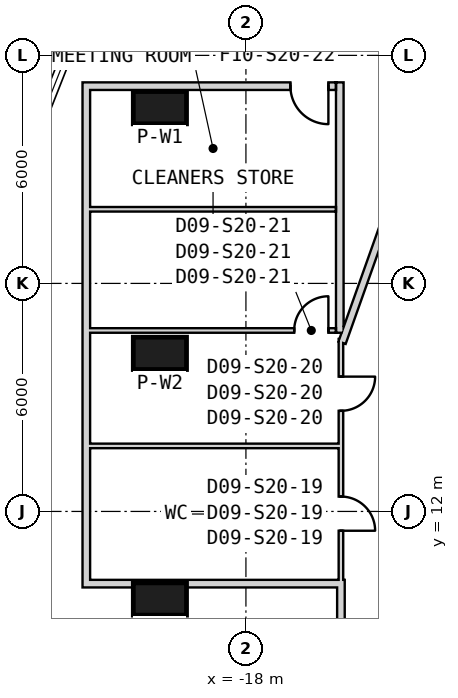
"""IFC4 building model, lengths in metres.
Left out: names, types, materials, properties, quantities, classifications, styles, units other than length and angle.
Written with IfcOpenShell. Run it as: python <this file> out.ifc"""

import sys

from ifc_helpers import new_model, si_unit, direction, frame, frame_2d, origin, origin_2d, place, context, subcontext, project, spatial, rectangle, extrude, element, fill, save


model = new_model("IFC4")
c1 = context("Model", 3, precision=1e-05, world=origin(), true_north=direction((0.0, 1.0)))
c2 = subcontext(c1, "Body", "Model", "MODEL_VIEW")
j1 = project(units=[si_unit("LENGTHUNIT", "METRE"), si_unit("PLANEANGLEUNIT", "RADIAN")], contexts=[c1])
p1 = place(None, origin())
s1 = spatial("IfcSite", under=j1, at=p1, CompositionType="ELEMENT")
p2 = place(p1, origin())
s2 = spatial("IfcBuilding", under=s1, at=p2, CompositionType="ELEMENT")
p3 = place(p2, frame((0.0, 0.0, 322.1)))
s3 = spatial("IfcBuildingStorey", under=s2, at=p3, CompositionType="ELEMENT", Elevation=322.1)
for number, where, z_axis, x_axis in (
    (1, (-20.264, 22.624, 0.0), (0.0, 0.0, 1.0), (-1.0, 0.0, 0.0)),
    (2, (-20.264, 16.16, 0.0), (0.0, 0.0, 1.0), (-1.0, 0.0, 0.0)),
    (3, (-20.264, 9.696, 0.0), (0.0, 0.0, 1.0), (-1.0, 0.0, 0.0)),
):
    element("IfcColumn", number, at=place(p3, frame(where, z_axis=z_axis, x_axis=x_axis)), inside=s3, PredefinedType="COLUMN", context=c2, shape_type="SweptSolid", body=[
        extrude(rectangle(XDim=1.4, YDim=0.85, at=origin_2d()), origin(), (0.0, 0.0, 1.0), 3.9),
    ])
p4 = place(p3, frame((-10.575, 18.316, 0.0), z_axis=(0.0, 0.0, 1.0), x_axis=(-0.499987805019, 0.866032444446, 0.0)))
e4 = element("IfcWall", 4, at=p4, inside=s3, PredefinedType="SHEAR", context=c2, shape_type="SweptSolid", body=[
    extrude(rectangle(XDim=8.787, YDim=0.6, at=frame_2d((4.394, 0.0))), origin(), (0.0, 0.0, 1.0), 3.9),
])
p5 = place(p4, frame((1.4, 0.0, 0.0)))
e5 = element("IfcOpeningElement", 5, at=p5, cuts=e4, PredefinedType="OPENING", context=c2, shape_type="SweptSolid", body=[
    extrude(rectangle(XDim=1.4, YDim=2.4, at=frame_2d((0.7, 1.2))), frame((0.0, 0.31, 0.0), z_axis=(0.0, -1.0, 0.0), x_axis=(1.0, 0.0, 0.0)), (0.0, 0.0, 1.0), 0.62),
])
p6 = place(p3, frame((-15.5, 16.538, 0.0), z_axis=(0.0, 0.0, 1.0), x_axis=(0.0, -1.0, 0.0)))
e6 = element("IfcWall", 6, at=p6, inside=s3, PredefinedType="PARTITIONING", context=c2, shape_type="SweptSolid", body=[
    extrude(rectangle(XDim=6.408, YDim=0.12, at=frame_2d((3.204, 0.0))), origin(), (0.0, 0.0, 1.0), 2.97),
])
p7 = place(p6, frame((4.146, 0.0, 0.0)))
e7 = element("IfcOpeningElement", 7, at=p7, cuts=e6, PredefinedType="OPENING", context=c2, shape_type="SweptSolid", body=[
    extrude(rectangle(XDim=0.9, YDim=2.1, at=frame_2d((0.45, 1.05))), frame((0.0, 0.07, 0.0), z_axis=(0.0, -1.0, 0.0), x_axis=(1.0, 0.0, 0.0)), (0.0, 0.0, 1.0), 0.14),
])
p8 = place(p6, frame((0.99, 0.0, 0.0)))
e8 = element("IfcOpeningElement", 8, at=p8, cuts=e6, PredefinedType="OPENING", context=c2, shape_type="SweptSolid", body=[
    extrude(rectangle(XDim=0.9, YDim=2.1, at=frame_2d((0.45, 1.05))), frame((0.0, 0.07, 0.0), z_axis=(0.0, -1.0, 0.0), x_axis=(1.0, 0.0, 0.0)), (0.0, 0.0, 1.0), 0.14),
])
p9 = place(p3, frame((-15.5, 10.2, 0.0), z_axis=(0.0, 0.0, 1.0), x_axis=(0.0, -1.0, 0.0)))
e9 = element("IfcWall", 9, at=p9, inside=s3, PredefinedType="PARTITIONING", context=c2, shape_type="SweptSolid", body=[
    extrude(rectangle(XDim=10.13, YDim=0.2, at=frame_2d((5.065, 0.0))), origin(), (0.0, 0.0, 1.0), 2.97),
])
p10 = place(p3, frame((-14.154, 20.142, 0.0), z_axis=(0.0, 0.0, 1.0), x_axis=(-0.335013345564, -0.94221338257, 0.0)))
e10 = element("IfcWall", 10, at=p10, inside=s3, PredefinedType="PARTITIONING", context=c2, shape_type="SweptSolid", body=[
    extrude(rectangle(XDim=3.929, YDim=0.2, at=frame_2d((1.964, 0.0))), origin(), (0.0, 0.0, 1.0), 2.88),
])
p11 = place(p3, frame((-22.2, 23.09, 0.0), z_axis=(0.0, 0.0, 1.0), x_axis=(0.0, -1.0, 0.0)))
e11 = element("IfcWall", 11, at=p11, inside=s3, PredefinedType="PARTITIONING", context=c2, shape_type="SweptSolid", body=[
    extrude(rectangle(XDim=3.14, YDim=0.2, at=frame_2d((1.57, 0.0))), origin(), (0.0, 0.0, 1.0), 3.6),
])
p12 = place(p3, frame((-22.2, 19.95, 0.0), z_axis=(0.0, 0.0, 1.0), x_axis=(0.0, -1.0, 0.0)))
e12 = element("IfcWall", 12, at=p12, inside=s3, PredefinedType="PARTITIONING", context=c2, shape_type="SweptSolid", body=[
    extrude(rectangle(XDim=3.188, YDim=0.2, at=frame_2d((1.594, 0.0))), origin(), (0.0, 0.0, 1.0), 3.6),
])
p13 = place(p3, frame((-22.2, 16.762, 0.0), z_axis=(0.0, 0.0, 1.0), x_axis=(0.0, -1.0, 0.0)))
e13 = element("IfcWall", 13, at=p13, inside=s3, PredefinedType="PARTITIONING", context=c2, shape_type="SweptSolid", body=[
    extrude(rectangle(XDim=6.562, YDim=0.2, at=frame_2d((3.281, 0.0))), origin(), (0.0, 0.0, 1.0), 3.6),
])
p14 = place(p3, frame((-15.6, 10.1, 0.0), z_axis=(0.0, 0.0, 1.0), x_axis=(-1.0, 0.0, 0.0)))
e14 = element("IfcWall", 14, at=p14, inside=s3, PredefinedType="PARTITIONING", context=c2, shape_type="SweptSolid", body=[
    extrude(rectangle(XDim=6.7, YDim=0.2, at=frame_2d((3.35, 0.0))), origin(), (0.0, 0.0, 1.0), 3.6),
])
p15 = place(p3, frame((-15.53, 16.702, 0.0), z_axis=(0.0, 0.0, 1.0), x_axis=(0.0, 1.0, 0.0)))
e15 = element("IfcWall", 15, at=p15, inside=s3, PredefinedType="PARTITIONING", context=c2, shape_type="SweptSolid", body=[
    extrude(rectangle(XDim=3.249, YDim=0.2, at=frame_2d((1.624, 0.0))), origin(), (0.0, 0.0, 1.0), 2.88),
])
p16 = place(p3, frame((-15.53, 19.95, 0.0), z_axis=(0.0, 0.0, 1.0), x_axis=(0.0, 1.0, 0.0)))
e16 = element("IfcWall", 16, at=p16, inside=s3, PredefinedType="PARTITIONING", context=c2, shape_type="SweptSolid", body=[
    extrude(rectangle(XDim=3.34, YDim=0.2, at=frame_2d((1.67, 0.0))), origin(), (0.0, 0.0, 1.0), 3.6),
])
p17 = place(p3, frame((-15.63, 23.19, 0.0), z_axis=(0.0, 0.0, 1.0), x_axis=(-1.0, 0.0, 0.0)))
e17 = element("IfcWall", 17, at=p17, inside=s3, PredefinedType="PARTITIONING", context=c2, shape_type="SweptSolid", body=[
    extrude(rectangle(XDim=6.67, YDim=0.2, at=frame_2d((3.335, 0.0))), origin(), (0.0, 0.0, 1.0), 3.6),
])
p18 = place(p17, frame((0.2, 0.0, 0.0)))
e18 = element("IfcOpeningElement", 18, at=p18, cuts=e17, PredefinedType="OPENING", context=c2, shape_type="SweptSolid", body=[
    extrude(rectangle(XDim=1.0, YDim=2.1, at=frame_2d((0.5, 1.05))), frame((0.0, 0.11, 0.0), z_axis=(0.0, -1.0, 0.0), x_axis=(1.0, 0.0, 0.0)), (0.0, 0.0, 1.0), 0.22),
])
p19 = place(p3, frame((-15.53, 13.724, 0.0), z_axis=(0.0, 0.0, 1.0), x_axis=(-1.0, 0.0, 0.0)))
e19 = element("IfcWall", 19, at=p19, inside=s3, PredefinedType="PARTITIONING", context=c2, shape_type="SweptSolid", body=[
    extrude(rectangle(XDim=6.57, YDim=0.12, at=frame_2d((3.285, 0.0))), origin(), (0.0, 0.0, 1.0), 2.97),
])
p20 = place(p3, frame((-22.1, 16.762, 0.0), z_axis=(0.0, 0.0, 1.0), x_axis=(1.0, 0.0, 0.0)))
e20 = element("IfcWall", 20, at=p20, inside=s3, PredefinedType="PARTITIONING", context=c2, shape_type="SweptSolid", body=[
    extrude(rectangle(XDim=6.47, YDim=0.12, at=frame_2d((3.235, 0.0))), origin(), (0.0, 0.0, 1.0), 3.6),
])
p21 = place(p20, frame((5.37, 0.0, 0.0)))
e21 = element("IfcOpeningElement", 21, at=p21, cuts=e20, PredefinedType="OPENING", context=c2, shape_type="SweptSolid", body=[
    extrude(rectangle(XDim=0.9, YDim=2.1, at=frame_2d((0.45, 1.05))), frame((0.0, 0.07, 0.0), z_axis=(0.0, -1.0, 0.0), x_axis=(1.0, 0.0, 0.0)), (0.0, 0.0, 1.0), 0.14),
])
p22 = place(p3, frame((-22.1, 19.95, 0.0), z_axis=(0.0, 0.0, 1.0), x_axis=(1.0, 0.0, 0.0)))
e22 = element("IfcWall", 22, at=p22, inside=s3, PredefinedType="PARTITIONING", context=c2, shape_type="SweptSolid", body=[
    extrude(rectangle(XDim=6.47, YDim=0.12, at=frame_2d((3.235, 0.0))), origin(), (0.0, 0.0, 1.0), 2.88),
])
p23 = place(p7, origin())
e23 = element("IfcDoor", 23, at=p23, inside=s3, OperationType="SINGLE_SWING_RIGHT", PredefinedType="NOTDEFINED", context=c2, shape_type="SweptSolid", body=[
    extrude(rectangle(XDim=0.9, YDim=2.1, at=frame_2d((0.45, 1.05))), frame((0.0, 0.025, 0.0), z_axis=(0.0, -1.0, 0.0), x_axis=(1.0, 0.0, 0.0)), (0.0, 0.0, 1.0), 0.05),
])
fill(e7, e23)
p24 = place(p8, origin())
e24 = element("IfcDoor", 24, at=p24, inside=s3, OperationType="SINGLE_SWING_LEFT", PredefinedType="NOTDEFINED", context=c2, shape_type="SweptSolid", body=[
    extrude(rectangle(XDim=0.9, YDim=2.1, at=frame_2d((0.45, 1.05))), frame((0.0, 0.025, 0.0), z_axis=(0.0, -1.0, 0.0), x_axis=(1.0, 0.0, 0.0)), (0.0, 0.0, 1.0), 0.05),
])
fill(e8, e24)
p25 = place(p21, origin())
e25 = element("IfcDoor", 25, at=p25, inside=s3, OperationType="SINGLE_SWING_RIGHT", PredefinedType="NOTDEFINED", context=c2, shape_type="SweptSolid", body=[
    extrude(rectangle(XDim=0.9, YDim=2.1, at=frame_2d((0.45, 1.05))), frame((0.0, 0.025, 0.0), z_axis=(0.0, -1.0, 0.0), x_axis=(1.0, 0.0, 0.0)), (0.0, 0.0, 1.0), 0.05),
])
fill(e21, e25)
p26 = place(p18, origin())
e26 = element("IfcDoor", 26, at=p26, inside=s3, OperationType="SINGLE_SWING_LEFT", PredefinedType="USERDEFINED", context=c2, shape_type="SweptSolid", body=[
    extrude(rectangle(XDim=1.0, YDim=2.1, at=frame_2d((0.5, 1.05))), frame((0.0, 0.025, 0.0), z_axis=(0.0, -1.0, 0.0), x_axis=(1.0, 0.0, 0.0)), (0.0, 0.0, 1.0), 0.05),
])
fill(e18, e26)
save(model, sys.argv[1])
